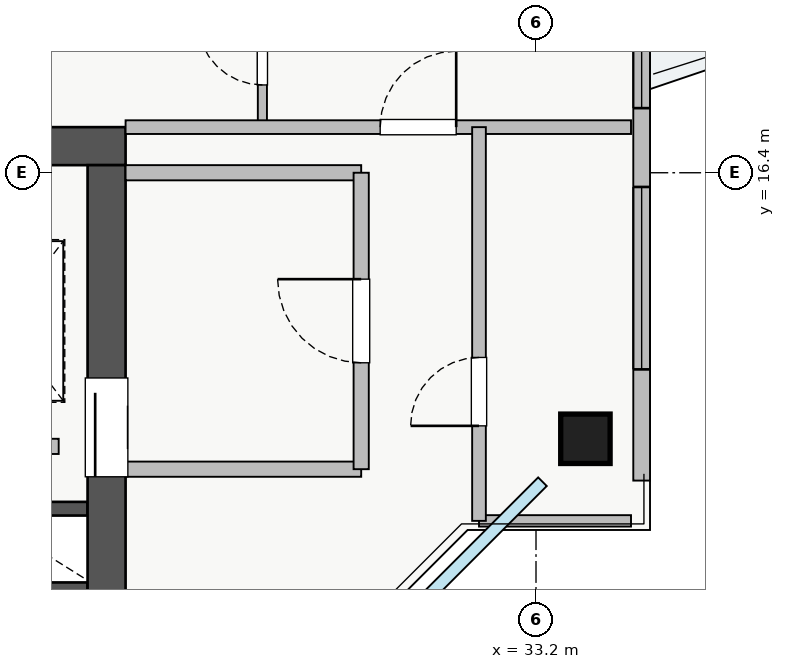
"""IFC4 building model, lengths in metres.
Left out: names, types, materials, properties, quantities, classifications, styles, units other than length and angle.
Written with IfcOpenShell. Run it as: python <this file> out.ifc"""

import sys

from ifc_helpers import new_model, si_unit, direction, frame, frame_2d, origin, origin_2d, place, context, subcontext, project, spatial, rectangle, extrude, source, transform, mapped, element, fill, save


model = new_model("IFC4")
c1 = context("Model", 3, precision=1e-05, world=origin(), true_north=direction((0.0, 1.0)))
c2 = subcontext(c1, "Body", "Model", "MODEL_VIEW")
j1 = project(units=[si_unit("LENGTHUNIT", "METRE"), si_unit("PLANEANGLEUNIT", "RADIAN")], contexts=[c1])
p1 = place(None, origin())
s1 = spatial("IfcSite", under=j1, at=p1, CompositionType="ELEMENT")
p2 = place(p1, origin())
s2 = spatial("IfcBuilding", under=s1, at=p2, CompositionType="ELEMENT")
p3 = place(p2, frame((0.0, 0.0, 247.0)))
s3 = spatial("IfcBuildingStorey", under=s2, at=p3, CompositionType="ELEMENT", Elevation=247.0)
for number, where, z_axis, x_axis in (
    (1, (25.8, 11.98, 0.0), (0.0, 0.0, 1.0), (1.0, 0.0, 0.0)),
    (2, (25.8, 10.92, 0.0), (0.0, 0.0, 1.0), (1.0, 0.0, 0.0)),
):
    element("IfcWall", number, at=place(p3, frame(where, z_axis=z_axis, x_axis=x_axis)), inside=s3, PredefinedType="SHEAR", context=c2, shape_type="SweptSolid", body=[
        extrude(rectangle(XDim=1.5, YDim=0.18, at=frame_2d((0.75, 0.0))), origin(), (0.0, 0.0, 1.0), 3.07),
    ])
p4 = place(p3, frame((10.2, 16.75, 0.0), z_axis=(0.0, 0.0, 1.0), x_axis=(1.0, 0.0, 0.0)))
e3 = element("IfcWall", 3, at=p4, inside=s3, PredefinedType="SHEAR", context=c2, shape_type="SweptSolid", body=[
    extrude(rectangle(XDim=17.6, YDim=0.5, at=frame_2d((8.8, 0.0))), origin(), (0.0, 0.0, 1.0), 3.25),
])
p5 = place(p3, frame((27.55, 10.3, 0.0), z_axis=(0.0, 0.0, 1.0), x_axis=(0.0, 1.0, 0.0)))
e4 = element("IfcWall", 4, at=p5, inside=s3, PredefinedType="SHEAR", context=c2, shape_type="SweptSolid", body=[
    extrude(rectangle(XDim=6.2, YDim=0.5, at=frame_2d((3.1, 0.0))), origin(), (0.0, 0.0, 1.0), 3.25),
])
p6 = place(p5, frame((2.1, 0.0, 0.0)))
e5 = element("IfcOpeningElement", 5, at=p6, cuts=e4, PredefinedType="OPENING", context=c2, shape_type="SweptSolid", body=[
    extrude(rectangle(XDim=1.3, YDim=2.05, at=frame_2d((0.65, 1.025))), frame((0.0, 0.26, 0.0), z_axis=(0.0, -1.0, 0.0), x_axis=(1.0, 0.0, 0.0)), (0.0, 0.0, 1.0), 0.52),
])
m1 = source(origin(), c2, "Body", "SweptSolid", [
    extrude(rectangle(XDim=0.65, YDim=0.65, at=origin_2d()), origin(), (0.0, 0.0, 1.0), 3.25),
])
p7 = place(p3, frame((33.85, 12.9, 0.0), z_axis=(0.0, 0.0, 1.0), x_axis=(1.0, 0.0, 0.0)))
e6 = element("IfcColumn", 6, at=p7, inside=s3, PredefinedType="COLUMN", context=c2, shape_type="MappedRepresentation", body=[
    mapped(m1, transform((0.0, 0.0, 0.0), x_axis=(1.0, 0.0, 0.0), y_axis=(0.0, 1.0, 0.0), z_axis=(0.0, 0.0, 1.0), scale=1.0)),
])
p8 = place(p3, frame((34.59, 12.35, 0.0), z_axis=(0.0, 0.0, 1.0), x_axis=(0.0, 1.0, 0.0)))
e7 = element("IfcWall", 7, at=p8, inside=s3, PredefinedType="STANDARD", context=c2, shape_type="SweptSolid", body=[
    extrude(rectangle(XDim=21.3, YDim=0.22, at=frame_2d((10.65, 0.0))), origin(), (0.0, 0.0, 1.0), 2.61),
])
p9 = place(p8, frame((11.5, 0.0, 0.0)))
e8 = element("IfcOpeningElement", 8, at=p9, cuts=e7, PredefinedType="OPENING", context=c2, shape_type="SweptSolid", body=[
    extrude(rectangle(XDim=1.2, YDim=2.1, at=frame_2d((0.6, 1.05))), frame((0.0, 0.12, 0.0), z_axis=(0.0, -1.0, 0.0), x_axis=(1.0, 0.0, 0.0)), (0.0, 0.0, 1.0), 0.24),
])
p10 = place(p8, frame((1.463, 0.0, 0.9)))
e9 = element("IfcOpeningElement", 9, at=p10, cuts=e7, PredefinedType="OPENING", context=c2, shape_type="SweptSolid", body=[
    extrude(rectangle(XDim=2.4, YDim=1.48, at=frame_2d((1.2, 0.74))), frame((0.0, 0.12, 0.0), z_axis=(0.0, -1.0, 0.0), x_axis=(1.0, 0.0, 0.0)), (0.0, 0.0, 1.0), 0.24),
])
p11 = place(p8, frame((17.588, 0.0, 0.9)))
e10 = element("IfcOpeningElement", 10, at=p11, cuts=e7, PredefinedType="OPENING", context=c2, shape_type="SweptSolid", body=[
    extrude(rectangle(XDim=2.1, YDim=1.48, at=frame_2d((1.05, 0.74))), frame((0.0, 0.12, 0.0), z_axis=(0.0, -1.0, 0.0), x_axis=(1.0, 0.0, 0.0)), (0.0, 0.0, 1.0), 0.24),
])
p12 = place(p8, frame((4.9, 0.0, 0.9)))
e11 = element("IfcOpeningElement", 11, at=p12, cuts=e7, PredefinedType="OPENING", context=c2, shape_type="SweptSolid", body=[
    extrude(rectangle(XDim=0.9, YDim=1.2, at=frame_2d((0.45, 0.6))), frame((0.0, 0.12, 0.0), z_axis=(0.0, -1.0, 0.0), x_axis=(1.0, 0.0, 0.0)), (0.0, 0.0, 1.0), 0.24),
])
p13 = place(p8, frame((9.685, 0.0, 0.9)))
e12 = element("IfcOpeningElement", 12, at=p13, cuts=e7, PredefinedType="OPENING", context=c2, shape_type="SweptSolid", body=[
    extrude(rectangle(XDim=0.9, YDim=1.2, at=frame_2d((0.45, 0.6))), frame((0.0, 0.12, 0.0), z_axis=(0.0, -1.0, 0.0), x_axis=(1.0, 0.0, 0.0)), (0.0, 0.0, 1.0), 0.24),
])
for number, where, z_axis, x_axis in (
    (13, (27.8, 16.4, 0.0), (0.0, 0.0, 1.0), (1.0, 0.0, 0.0)),
    (14, (27.8, 12.5, 0.0), (0.0, 0.0, 1.0), (1.0, 0.0, 0.0)),
):
    element("IfcWall", number, at=place(p3, frame(where, z_axis=z_axis, x_axis=x_axis)), inside=s3, PredefinedType="PARTITIONING", context=c2, shape_type="SweptSolid", body=[
        extrude(rectangle(XDim=3.1, YDim=0.2, at=frame_2d((1.55, 0.0))), origin(), (0.0, 0.0, 1.0), 3.07),
    ])
p14 = place(p3, frame((30.9, 12.5, 0.0), z_axis=(0.0, 0.0, 1.0), x_axis=(0.0, 1.0, 0.0)))
e15 = element("IfcWall", 15, at=p14, inside=s3, PredefinedType="PARTITIONING", context=c2, shape_type="SweptSolid", body=[
    extrude(rectangle(XDim=3.9, YDim=0.2, at=frame_2d((1.95, 0.0))), origin(), (0.0, 0.0, 1.0), 2.715),
])
p15 = place(p14, frame((1.4, 0.0, 0.0)))
e16 = element("IfcOpeningElement", 16, at=p15, cuts=e15, PredefinedType="OPENING", context=c2, shape_type="SweptSolid", body=[
    extrude(rectangle(XDim=1.1, YDim=2.05, at=frame_2d((0.55, 1.025))), frame((0.0, 0.11, 0.0), z_axis=(0.0, -1.0, 0.0), x_axis=(1.0, 0.0, 0.0)), (0.0, 0.0, 1.0), 0.22),
])
p16 = place(p3, frame((21.75, 12.8, 0.0), z_axis=(0.0, 0.0, 1.0), x_axis=(1.0, 0.0, 0.0)))
e17 = element("IfcWall", 17, at=p16, inside=s3, PredefinedType="PARTITIONING", context=c2, shape_type="SweptSolid", body=[
    extrude(rectangle(XDim=5.17, YDim=0.2, at=frame_2d((2.585, 0.0))), origin(), (0.0, 0.0, 1.0), 3.07),
])
p17 = place(p3, frame((29.6, 17.0, 0.0), z_axis=(0.0, 0.0, 1.0), x_axis=(0.0, 1.0, 0.0)))
e18 = element("IfcWall", 18, at=p17, inside=s3, PredefinedType="PLUMBINGWALL", context=c2, shape_type="SweptSolid", body=[
    extrude(rectangle(XDim=4.8, YDim=0.12, at=frame_2d((2.4, 0.0))), origin(), (0.0, 0.0, 1.0), 3.07),
])
p18 = place(p17, frame((0.555, 0.0, 0.0)))
e19 = element("IfcOpeningElement", 19, at=p18, cuts=e18, PredefinedType="OPENING", context=c2, shape_type="SweptSolid", body=[
    extrude(rectangle(XDim=0.85, YDim=2.05, at=frame_2d((0.425, 1.025))), frame((0.0, 0.07, 0.0), z_axis=(0.0, -1.0, 0.0), x_axis=(1.0, 0.0, 0.0)), (0.0, 0.0, 1.0), 0.14),
])
p19 = place(p17, frame((2.89, 0.0, 0.0)))
e20 = element("IfcOpeningElement", 20, at=p19, cuts=e18, PredefinedType="OPENING", context=c2, shape_type="SweptSolid", body=[
    extrude(rectangle(XDim=0.9, YDim=2.05, at=frame_2d((0.45, 1.025))), frame((0.0, 0.07, 0.0), z_axis=(0.0, -1.0, 0.0), x_axis=(1.0, 0.0, 0.0)), (0.0, 0.0, 1.0), 0.14),
])
p20 = place(p3, frame((27.8, 17.0, 0.0), z_axis=(0.0, 0.0, 1.0), x_axis=(1.0, 0.0, 0.0)))
e21 = element("IfcWall", 21, at=p20, inside=s3, PredefinedType="PARTITIONING", context=c2, shape_type="SweptSolid", body=[
    extrude(rectangle(XDim=6.65, YDim=0.18, at=frame_2d((3.325, 0.0))), origin(), (0.0, 0.0, 1.0), 3.07),
])
p21 = place(p20, frame((3.35, 0.0, 0.0)))
e22 = element("IfcOpeningElement", 22, at=p21, cuts=e21, PredefinedType="OPENING", context=c2, shape_type="SweptSolid", body=[
    extrude(rectangle(XDim=1.0, YDim=2.05, at=frame_2d((0.5, 1.025))), frame((0.0, 0.1, 0.0), z_axis=(0.0, -1.0, 0.0), x_axis=(1.0, 0.0, 0.0)), (0.0, 0.0, 1.0), 0.2),
])
p22 = place(p3, frame((32.45, 11.82, 0.0), z_axis=(0.0, 0.0, 1.0), x_axis=(1.0, 0.0, 0.0)))
e23 = element("IfcWall", 23, at=p22, inside=s3, PredefinedType="PARTITIONING", context=c2, shape_type="SweptSolid", body=[
    extrude(rectangle(XDim=2.0, YDim=0.15, at=frame_2d((1.0, 0.0))), origin(), (0.0, 0.0, 1.0), 3.07),
])
p23 = place(p3, frame((32.45, 11.82, 0.0), z_axis=(0.0, 0.0, 1.0), x_axis=(0.0, 1.0, 0.0)))
e24 = element("IfcWall", 24, at=p23, inside=s3, PredefinedType="PARTITIONING", context=c2, shape_type="SweptSolid", body=[
    extrude(rectangle(XDim=5.18, YDim=0.18, at=frame_2d((2.59, 0.0))), origin(), (0.0, 0.0, 1.0), 3.07),
])
p24 = place(p23, frame((1.25, 0.0, 0.0)))
e25 = element("IfcOpeningElement", 25, at=p24, cuts=e24, PredefinedType="OPENING", context=c2, shape_type="SweptSolid", body=[
    extrude(rectangle(XDim=0.9, YDim=2.05, at=frame_2d((0.45, 1.025))), frame((0.0, 0.1, 0.0), z_axis=(0.0, -1.0, 0.0), x_axis=(1.0, 0.0, 0.0)), (0.0, 0.0, 1.0), 0.2),
])
m2 = source(origin(), c2, "Body", "SweptSolid", [
    extrude(rectangle(XDim=2.4, YDim=1.48, at=frame_2d((1.2, 0.74))), frame((0.0, 0.03, 0.0), z_axis=(0.0, -1.0, 0.0), x_axis=(1.0, 0.0, 0.0)), (0.0, 0.0, 1.0), 0.06),
])
p25 = place(p10, origin())
e26 = element("IfcWindow", 26, at=p25, inside=s3, PartitioningType="TRIPLE_PANEL_VERTICAL", PredefinedType="WINDOW", context=c2, shape_type="MappedRepresentation", body=[
    mapped(m2, transform((0.0, 0.0, 0.0), x_axis=(1.0, 0.0, 0.0), y_axis=(0.0, 1.0, 0.0), z_axis=(0.0, 0.0, 1.0), scale=1.0)),
])
fill(e9, e26)
m3 = source(origin(), c2, "Body", "SweptSolid", [
    extrude(rectangle(XDim=1.3, YDim=2.05, at=frame_2d((0.65, 1.025))), frame((0.0, 0.025, 0.0), z_axis=(0.0, -1.0, 0.0), x_axis=(1.0, 0.0, 0.0)), (0.0, 0.0, 1.0), 0.05),
])
p26 = place(p6, origin())
e27 = element("IfcDoor", 27, at=p26, inside=s3, OperationType="SLIDING_TO_RIGHT", PredefinedType="DOOR", context=c2, shape_type="MappedRepresentation", body=[
    mapped(m3, transform((0.0, 0.0, 0.0), x_axis=(1.0, 0.0, 0.0), y_axis=(0.0, 1.0, 0.0), z_axis=(0.0, 0.0, 1.0), scale=1.0)),
])
fill(e5, e27)
m4 = source(origin(), c2, "Body", "SweptSolid", [
    extrude(rectangle(XDim=1.1, YDim=2.05, at=frame_2d((0.55, 1.025))), frame((0.0, 0.025, 0.0), z_axis=(0.0, -1.0, 0.0), x_axis=(1.0, 0.0, 0.0)), (0.0, 0.0, 1.0), 0.05),
])
p27 = place(p15, origin())
e28 = element("IfcDoor", 28, at=p27, inside=s3, OperationType="SINGLE_SWING_RIGHT", PredefinedType="DOOR", context=c2, shape_type="MappedRepresentation", body=[
    mapped(m4, transform((0.0, 0.0, 0.0), x_axis=(1.0, 0.0, 0.0), y_axis=(0.0, 1.0, 0.0), z_axis=(0.0, 0.0, 1.0), scale=1.0)),
])
fill(e16, e28)
m5 = source(origin(), c2, "Body", "SweptSolid", [
    extrude(rectangle(XDim=0.85, YDim=2.05, at=frame_2d((0.425, 1.025))), frame((0.0, 0.025, 0.0), z_axis=(0.0, -1.0, 0.0), x_axis=(1.0, 0.0, 0.0)), (0.0, 0.0, 1.0), 0.05),
])
p28 = place(p18, origin())
e29 = element("IfcDoor", 29, at=p28, inside=s3, OperationType="SINGLE_SWING_RIGHT", PredefinedType="DOOR", context=c2, shape_type="MappedRepresentation", body=[
    mapped(m5, transform((0.0, 0.0, 0.0), x_axis=(1.0, 0.0, 0.0), y_axis=(0.0, 1.0, 0.0), z_axis=(0.0, 0.0, 1.0), scale=1.0)),
])
fill(e19, e29)
m6 = source(origin(), c2, "Body", "SweptSolid", [
    extrude(rectangle(XDim=1.0, YDim=2.05, at=frame_2d((0.5, 1.025))), frame((0.0, 0.025, 0.0), z_axis=(0.0, -1.0, 0.0), x_axis=(1.0, 0.0, 0.0)), (0.0, 0.0, 1.0), 0.05),
])
p29 = place(p21, origin())
e30 = element("IfcDoor", 30, at=p29, inside=s3, OperationType="SINGLE_SWING_RIGHT", PredefinedType="DOOR", context=c2, shape_type="MappedRepresentation", body=[
    mapped(m6, transform((0.0, 0.0, 0.0), x_axis=(1.0, 0.0, 0.0), y_axis=(0.0, 1.0, 0.0), z_axis=(0.0, 0.0, 1.0), scale=1.0)),
])
fill(e22, e30)
m7 = source(origin(), c2, "Body", "SweptSolid", [
    extrude(rectangle(XDim=0.9, YDim=2.05, at=frame_2d((0.45, 1.025))), frame((0.0, 0.025, 0.0), z_axis=(0.0, -1.0, 0.0), x_axis=(1.0, 0.0, 0.0)), (0.0, 0.0, 1.0), 0.05),
])
p30 = place(p24, origin())
e31 = element("IfcDoor", 31, at=p30, inside=s3, OperationType="SINGLE_SWING_LEFT", PredefinedType="DOOR", context=c2, shape_type="MappedRepresentation", body=[
    mapped(m7, transform((0.0, 0.0, 0.0), x_axis=(1.0, 0.0, 0.0), y_axis=(0.0, 1.0, 0.0), z_axis=(0.0, 0.0, 1.0), scale=1.0)),
])
fill(e25, e31)
m8 = source(origin(), c2, "Body", "SweptSolid", [
    extrude(rectangle(XDim=0.9, YDim=1.2, at=frame_2d((0.45, 0.6))), frame((0.0, 0.03, 0.0), z_axis=(0.0, -1.0, 0.0), x_axis=(1.0, 0.0, 0.0)), (0.0, 0.0, 1.0), 0.06),
])
p31 = place(p12, origin())
e32 = element("IfcWindow", 32, at=p31, inside=s3, PartitioningType="SINGLE_PANEL", PredefinedType="WINDOW", context=c2, shape_type="MappedRepresentation", body=[
    mapped(m8, transform((0.0, 0.0, 0.0), x_axis=(1.0, 0.0, 0.0), y_axis=(0.0, 1.0, 0.0), z_axis=(0.0, 0.0, 1.0), scale=1.0)),
])
fill(e11, e32)
save(model, sys.argv[1])
